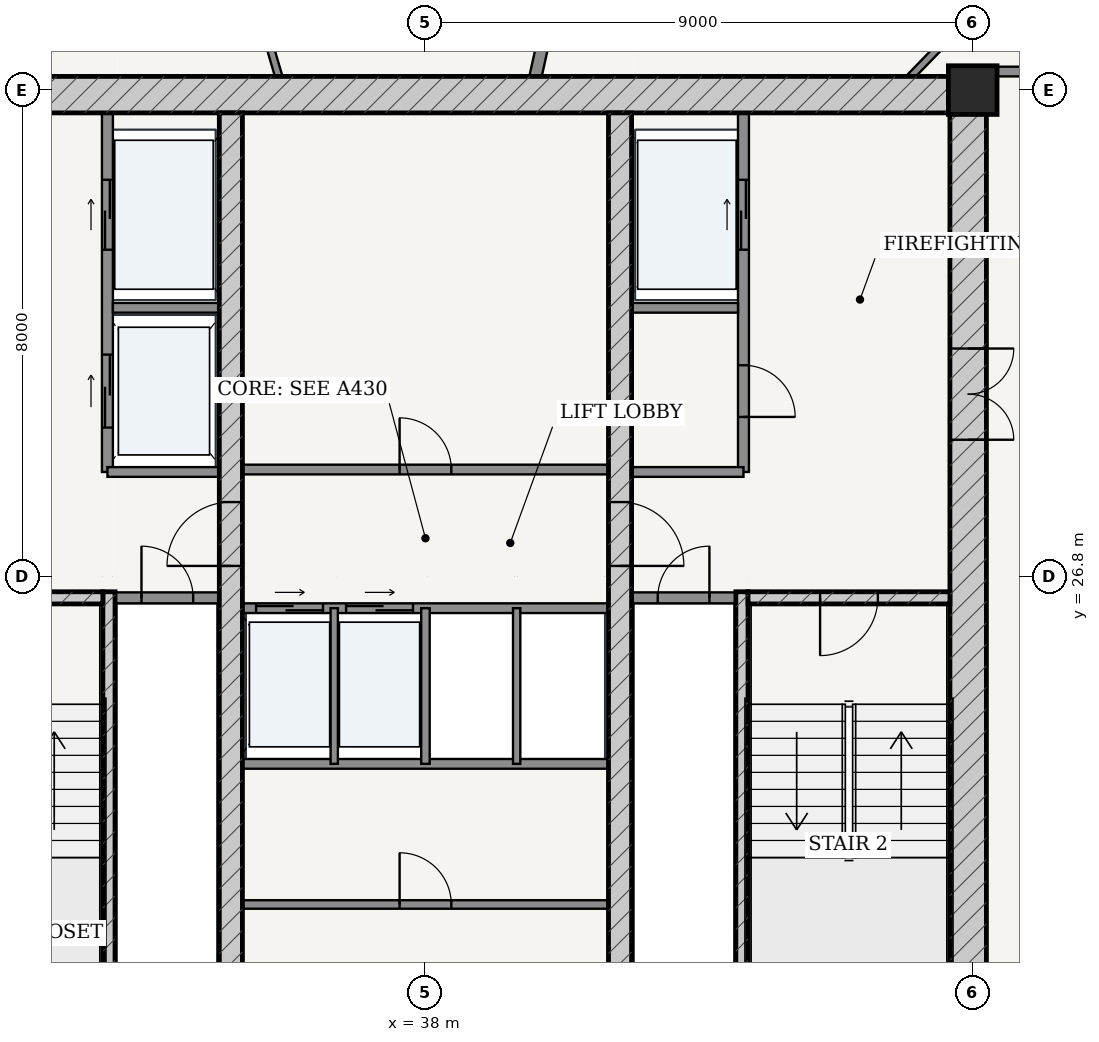
"""IFC4 building model, lengths in metres.
Left out: names, types, materials, properties, quantities, classifications, styles, units other than length and angle.
Written with IfcOpenShell. Run it as: python <this file> out.ifc"""

import sys

from ifc_helpers import new_model, si_unit, direction, frame, frame_2d, origin, origin_2d, place, context, subcontext, project, spatial, rectangle, extrude, source, transform, mapped, element, fill, save


model = new_model("IFC4")
c1 = context("Model", 3, precision=1e-05, world=origin(), true_north=direction((-0.2419218956, 0.970295726276)))
c2 = subcontext(c1, "Body", "Model", "MODEL_VIEW")
j1 = project(units=[si_unit("LENGTHUNIT", "METRE"), si_unit("PLANEANGLEUNIT", "RADIAN")], contexts=[c1])
p1 = place(None, origin())
s1 = spatial("IfcSite", under=j1, at=p1, CompositionType="ELEMENT")
p2 = place(p1, origin())
s2 = spatial("IfcBuilding", under=s1, at=p2, CompositionType="ELEMENT")
p3 = place(p2, frame((0.0, 0.0, 224.5)))
s3 = spatial("IfcBuildingStorey", under=s2, at=p3, CompositionType="ELEMENT", Elevation=224.5)
p4 = place(p3, frame((47.0, 34.8, 0.0), z_axis=(0.0, 0.0, 1.0), x_axis=(1.0, 0.0, 0.0)))
e1 = element("IfcColumn", 1, at=p4, inside=s3, PredefinedType="COLUMN", context=c2, shape_type="SweptSolid", body=[
    extrude(rectangle(XDim=0.8, YDim=0.8, at=origin_2d()), origin(), (0.0, 0.0, 1.0), 3.7),
])
p5 = place(p3, frame((28.775, 34.725, 0.0), z_axis=(0.0, 0.0, 1.0), x_axis=(1.0, 0.0, 0.0)))
e2 = element("IfcWall", 2, at=p5, inside=s3, PredefinedType="SHEAR", context=c2, shape_type="SweptSolid", body=[
    extrude(rectangle(XDim=18.45, YDim=0.6, at=frame_2d((9.225, 0.0))), origin(), (0.0, 0.0, 1.0), 3.435),
])
p6 = place(p3, frame((46.925, 19.175, 0.0), z_axis=(0.0, 0.0, 1.0), x_axis=(0.0, 1.0, 0.0)))
e3 = element("IfcWall", 3, at=p6, inside=s3, PredefinedType="SHEAR", context=c2, shape_type="SweptSolid", body=[
    extrude(rectangle(XDim=15.25, YDim=0.6, at=frame_2d((7.625, 0.0))), origin(), (0.0, 0.0, 1.0), 3.435),
])
p7 = place(p6, frame((9.875, 0.0, 0.0)))
e4 = element("IfcOpeningElement", 4, at=p7, cuts=e3, PredefinedType="OPENING", context=c2, shape_type="SweptSolid", body=[
    extrude(rectangle(XDim=1.5, YDim=2.2, at=frame_2d((0.75, 1.1))), frame((0.0, 0.31, 0.0), z_axis=(0.0, -1.0, 0.0), x_axis=(1.0, 0.0, 0.0)), (0.0, 0.0, 1.0), 0.62),
])
p8 = place(p3, frame((32.795, 19.175, 0.0), z_axis=(0.0, 0.0, 1.0), x_axis=(0.0, 1.0, 0.0)))
e5 = element("IfcWall", 5, at=p8, inside=s3, PredefinedType="SOLIDWALL", context=c2, shape_type="SweptSolid", body=[
    extrude(rectangle(XDim=7.375, YDim=0.2, at=frame_2d((3.688, 0.0))), origin(), (0.0, 0.0, 1.0), 3.435),
])
p9 = place(p3, frame((29.375, 26.45, 0.0), z_axis=(0.0, 0.0, 1.0), x_axis=(1.0, 0.0, 0.0)))
e6 = element("IfcWall", 6, at=p9, inside=s3, PredefinedType="SOLIDWALL", context=c2, shape_type="SweptSolid", body=[
    extrude(rectangle(XDim=3.32, YDim=0.2, at=frame_2d((1.66, 0.0))), origin(), (0.0, 0.0, 1.0), 3.435),
])
p10 = place(p9, frame((1.185, 0.0, 0.0)))
e7 = element("IfcOpeningElement", 7, at=p10, cuts=e6, PredefinedType="OPENING", context=c2, shape_type="SweptSolid", body=[
    extrude(rectangle(XDim=0.95, YDim=2.15, at=frame_2d((0.475, 1.075))), frame((0.0, 0.11, 0.0), z_axis=(0.0, -1.0, 0.0), x_axis=(1.0, 0.0, 0.0)), (0.0, 0.0, 1.0), 0.22),
])
p11 = place(p3, frame((43.205, 19.175, 0.0), z_axis=(0.0, 0.0, 1.0), x_axis=(0.0, 1.0, 0.0)))
e8 = element("IfcWall", 8, at=p11, inside=s3, PredefinedType="SOLIDWALL", context=c2, shape_type="SweptSolid", body=[
    extrude(rectangle(XDim=7.375, YDim=0.2, at=frame_2d((3.688, 0.0))), origin(), (0.0, 0.0, 1.0), 3.435),
])
p12 = place(p3, frame((43.305, 26.45, 0.0), z_axis=(0.0, 0.0, 1.0), x_axis=(1.0, 0.0, 0.0)))
e9 = element("IfcWall", 9, at=p12, inside=s3, PredefinedType="SOLIDWALL", context=c2, shape_type="SweptSolid", body=[
    extrude(rectangle(XDim=3.32, YDim=0.2, at=frame_2d((1.66, 0.0))), origin(), (0.0, 0.0, 1.0), 3.435),
])
p13 = place(p12, frame((1.185, 0.0, 0.0)))
e10 = element("IfcOpeningElement", 10, at=p13, cuts=e9, PredefinedType="OPENING", context=c2, shape_type="SweptSolid", body=[
    extrude(rectangle(XDim=0.95, YDim=2.15, at=frame_2d((0.475, 1.075))), frame((0.0, 0.11, 0.0), z_axis=(0.0, -1.0, 0.0), x_axis=(1.0, 0.0, 0.0)), (0.0, 0.0, 1.0), 0.22),
])
p14 = place(p3, frame((34.8, 19.175, 0.0), z_axis=(0.0, 0.0, 1.0), x_axis=(0.0, 1.0, 0.0)))
e11 = element("IfcWall", 11, at=p14, inside=s3, PredefinedType="SHEAR", context=c2, shape_type="SweptSolid", body=[
    extrude(rectangle(XDim=15.25, YDim=0.38, at=frame_2d((7.625, 0.0))), origin(), (0.0, 0.0, 1.0), 3.435),
])
p15 = place(p14, frame((7.8, 0.0, 0.0)))
e12 = element("IfcOpeningElement", 12, at=p15, cuts=e11, PredefinedType="OPENING", context=c2, shape_type="SweptSolid", body=[
    extrude(rectangle(XDim=1.05, YDim=2.15, at=frame_2d((0.525, 1.075))), frame((0.0, 0.2, 0.0), z_axis=(0.0, -1.0, 0.0), x_axis=(1.0, 0.0, 0.0)), (0.0, 0.0, 1.0), 0.4),
])
p16 = place(p3, frame((41.2, 19.175, 0.0), z_axis=(0.0, 0.0, 1.0), x_axis=(0.0, 1.0, 0.0)))
e13 = element("IfcWall", 13, at=p16, inside=s3, PredefinedType="SHEAR", context=c2, shape_type="SweptSolid", body=[
    extrude(rectangle(XDim=15.25, YDim=0.38, at=frame_2d((7.625, 0.0))), origin(), (0.0, 0.0, 1.0), 3.435),
])
p17 = place(p16, frame((7.8, 0.0, 0.0)))
e14 = element("IfcOpeningElement", 14, at=p17, cuts=e13, PredefinedType="OPENING", context=c2, shape_type="SweptSolid", body=[
    extrude(rectangle(XDim=1.05, YDim=2.15, at=frame_2d((0.525, 1.075))), frame((0.0, 0.2, 0.0), z_axis=(0.0, -1.0, 0.0), x_axis=(1.0, 0.0, 0.0)), (0.0, 0.0, 1.0), 0.4),
])
p18 = place(p3, frame((32.9, 26.45, 0.0), z_axis=(0.0, 0.0, 1.0), x_axis=(1.0, 0.0, 0.0)))
e15 = element("IfcWall", 15, at=p18, inside=s3, PredefinedType="PARTITIONING", context=c2, shape_type="SweptSolid", body=[
    extrude(rectangle(XDim=1.71, YDim=0.18, at=frame_2d((0.855, 0.0))), origin(), (0.0, 0.0, 1.0), 3.435),
])
p19 = place(p18, frame((0.43, 0.0, 0.0)))
e16 = element("IfcOpeningElement", 16, at=p19, cuts=e15, PredefinedType="OPENING", context=c2, shape_type="SweptSolid", body=[
    extrude(rectangle(XDim=0.85, YDim=2.1, at=frame_2d((0.425, 1.05))), frame((0.0, 0.1, 0.0), z_axis=(0.0, -1.0, 0.0), x_axis=(1.0, 0.0, 0.0)), (0.0, 0.0, 1.0), 0.2),
])
p20 = place(p3, frame((41.39, 26.45, 0.0), z_axis=(0.0, 0.0, 1.0), x_axis=(1.0, 0.0, 0.0)))
e17 = element("IfcWall", 17, at=p20, inside=s3, PredefinedType="PARTITIONING", context=c2, shape_type="SweptSolid", body=[
    extrude(rectangle(XDim=1.71, YDim=0.18, at=frame_2d((0.855, 0.0))), origin(), (0.0, 0.0, 1.0), 3.435),
])
p21 = place(p20, frame((0.43, 0.0, 0.0)))
e18 = element("IfcOpeningElement", 18, at=p21, cuts=e17, PredefinedType="OPENING", context=c2, shape_type="SweptSolid", body=[
    extrude(rectangle(XDim=0.85, YDim=2.1, at=frame_2d((0.425, 1.05))), frame((0.0, 0.1, 0.0), z_axis=(0.0, -1.0, 0.0), x_axis=(1.0, 0.0, 0.0)), (0.0, 0.0, 1.0), 0.2),
])
p22 = place(p3, frame((32.77, 28.52, 0.0), z_axis=(0.0, 0.0, 1.0), x_axis=(0.0, 1.0, 0.0)))
e19 = element("IfcWall", 19, at=p22, inside=s3, PredefinedType="PARTITIONING", context=c2, shape_type="SweptSolid", body=[
    extrude(rectangle(XDim=5.905, YDim=0.18, at=frame_2d((2.953, 0.0))), origin(), (0.0, 0.0, 1.0), 3.435),
])
p23 = place(p22, frame((3.655, 0.0, 0.0)))
e20 = element("IfcOpeningElement", 20, at=p23, cuts=e19, PredefinedType="OPENING", context=c2, shape_type="SweptSolid", body=[
    extrude(rectangle(XDim=1.15, YDim=2.2, at=frame_2d((0.575, 1.1))), frame((0.0, 0.1, 0.0), z_axis=(0.0, -1.0, 0.0), x_axis=(1.0, 0.0, 0.0)), (0.0, 0.0, 1.0), 0.2),
])
p24 = place(p22, frame((0.73, 0.0, 0.0)))
e21 = element("IfcOpeningElement", 21, at=p24, cuts=e19, PredefinedType="OPENING", context=c2, shape_type="SweptSolid", body=[
    extrude(rectangle(XDim=1.2, YDim=2.25, at=frame_2d((0.6, 1.125))), frame((0.0, 0.1, 0.0), z_axis=(0.0, -1.0, 0.0), x_axis=(1.0, 0.0, 0.0)), (0.0, 0.0, 1.0), 0.2),
])
p25 = place(p3, frame((32.86, 31.22, 0.0), z_axis=(0.0, 0.0, 1.0), x_axis=(1.0, 0.0, 0.0)))
e22 = element("IfcWall", 22, at=p25, inside=s3, PredefinedType="PARTITIONING", context=c2, shape_type="SweptSolid", body=[
    extrude(rectangle(XDim=1.75, YDim=0.16, at=frame_2d((0.875, 0.0))), origin(), (0.0, 0.0, 1.0), 3.435),
])
p26 = place(p3, frame((32.77, 28.52, 0.0), z_axis=(0.0, 0.0, 1.0), x_axis=(1.0, 0.0, 0.0)))
e23 = element("IfcWall", 23, at=p26, inside=s3, PredefinedType="PARTITIONING", context=c2, shape_type="SweptSolid", body=[
    extrude(rectangle(XDim=1.84, YDim=0.16, at=frame_2d((0.92, 0.0))), origin(), (0.0, 0.0, 1.0), 3.435),
])
p27 = place(p3, frame((43.23, 28.52, 0.0), z_axis=(0.0, 0.0, 1.0), x_axis=(0.0, 1.0, 0.0)))
e24 = element("IfcWall", 24, at=p27, inside=s3, PredefinedType="PARTITIONING", context=c2, shape_type="SweptSolid", body=[
    extrude(rectangle(XDim=5.905, YDim=0.18, at=frame_2d((2.953, 0.0))), origin(), (0.0, 0.0, 1.0), 3.435),
])
p28 = place(p27, frame((0.905, 0.0, 0.0)))
e25 = element("IfcOpeningElement", 25, at=p28, cuts=e24, PredefinedType="OPENING", context=c2, shape_type="SweptSolid", body=[
    extrude(rectangle(XDim=0.85, YDim=2.1, at=frame_2d((0.425, 1.05))), frame((0.0, 0.1, 0.0), z_axis=(0.0, -1.0, 0.0), x_axis=(1.0, 0.0, 0.0)), (0.0, 0.0, 1.0), 0.2),
])
p29 = place(p27, frame((3.655, 0.0, 0.0)))
e26 = element("IfcOpeningElement", 26, at=p29, cuts=e24, PredefinedType="OPENING", context=c2, shape_type="SweptSolid", body=[
    extrude(rectangle(XDim=1.15, YDim=2.2, at=frame_2d((0.575, 1.1))), frame((0.0, 0.1, 0.0), z_axis=(0.0, -1.0, 0.0), x_axis=(1.0, 0.0, 0.0)), (0.0, 0.0, 1.0), 0.2),
])
p30 = place(p3, frame((41.39, 31.22, 0.0), z_axis=(0.0, 0.0, 1.0), x_axis=(1.0, 0.0, 0.0)))
e27 = element("IfcWall", 27, at=p30, inside=s3, PredefinedType="PARTITIONING", context=c2, shape_type="SweptSolid", body=[
    extrude(rectangle(XDim=1.75, YDim=0.16, at=frame_2d((0.875, 0.0))), origin(), (0.0, 0.0, 1.0), 3.435),
])
p31 = place(p3, frame((41.39, 28.52, 0.0), z_axis=(0.0, 0.0, 1.0), x_axis=(1.0, 0.0, 0.0)))
e28 = element("IfcWall", 28, at=p31, inside=s3, PredefinedType="PARTITIONING", context=c2, shape_type="SweptSolid", body=[
    extrude(rectangle(XDim=1.84, YDim=0.16, at=frame_2d((0.92, 0.0))), origin(), (0.0, 0.0, 1.0), 3.435),
])
p32 = place(p3, frame((34.99, 28.56, 0.0), z_axis=(0.0, 0.0, 1.0), x_axis=(1.0, 0.0, 0.0)))
e29 = element("IfcWall", 29, at=p32, inside=s3, PredefinedType="PARTITIONING", context=c2, shape_type="SweptSolid", body=[
    extrude(rectangle(XDim=6.02, YDim=0.16, at=frame_2d((3.01, 0.0))), origin(), (0.0, 0.0, 1.0), 3.435),
])
p33 = place(p32, frame((2.585, 0.0, 0.0)))
e30 = element("IfcOpeningElement", 30, at=p33, cuts=e29, PredefinedType="OPENING", context=c2, shape_type="SweptSolid", body=[
    extrude(rectangle(XDim=0.85, YDim=2.1, at=frame_2d((0.425, 1.05))), frame((0.0, 0.09, 0.0), z_axis=(0.0, -1.0, 0.0), x_axis=(1.0, 0.0, 0.0)), (0.0, 0.0, 1.0), 0.18),
])
p34 = place(p3, frame((34.99, 26.28, 0.0), z_axis=(0.0, 0.0, 1.0), x_axis=(1.0, 0.0, 0.0)))
e31 = element("IfcWall", 31, at=p34, inside=s3, PredefinedType="PARTITIONING", context=c2, shape_type="SweptSolid", body=[
    extrude(rectangle(XDim=6.02, YDim=0.16, at=frame_2d((3.01, 0.0))), origin(), (0.0, 0.0, 1.0), 3.435),
])
p35 = place(p34, frame((0.225, 0.0, 0.0)))
e32 = element("IfcOpeningElement", 32, at=p35, cuts=e31, PredefinedType="OPENING", context=c2, shape_type="SweptSolid", body=[
    extrude(rectangle(XDim=1.1, YDim=2.2, at=frame_2d((0.55, 1.1))), frame((0.0, 0.09, 0.0), z_axis=(0.0, -1.0, 0.0), x_axis=(1.0, 0.0, 0.0)), (0.0, 0.0, 1.0), 0.18),
])
p36 = place(p34, frame((1.705, 0.0, 0.0)))
e33 = element("IfcOpeningElement", 33, at=p36, cuts=e31, PredefinedType="OPENING", context=c2, shape_type="SweptSolid", body=[
    extrude(rectangle(XDim=1.1, YDim=2.2, at=frame_2d((0.55, 1.1))), frame((0.0, 0.09, 0.0), z_axis=(0.0, -1.0, 0.0), x_axis=(1.0, 0.0, 0.0)), (0.0, 0.0, 1.0), 0.18),
])
p37 = place(p3, frame((34.99, 23.72, 0.0), z_axis=(0.0, 0.0, 1.0), x_axis=(1.0, 0.0, 0.0)))
e34 = element("IfcWall", 34, at=p37, inside=s3, PredefinedType="PARTITIONING", context=c2, shape_type="SweptSolid", body=[
    extrude(rectangle(XDim=6.02, YDim=0.16, at=frame_2d((3.01, 0.0))), origin(), (0.0, 0.0, 1.0), 3.435),
])
p38 = place(p3, frame((36.5, 23.72, 0.0), z_axis=(0.0, 0.0, 1.0), x_axis=(0.0, 1.0, 0.0)))
e35 = element("IfcWall", 35, at=p38, inside=s3, PredefinedType="PARTITIONING", context=c2, shape_type="SweptSolid", body=[
    extrude(rectangle(XDim=2.56, YDim=0.12, at=frame_2d((1.28, 0.0))), origin(), (0.0, 0.0, 1.0), 3.435),
])
p39 = place(p3, frame((38.0, 23.72, 0.0), z_axis=(0.0, 0.0, 1.0), x_axis=(0.0, 1.0, 0.0)))
e36 = element("IfcWall", 36, at=p39, inside=s3, PredefinedType="PARTITIONING", context=c2, shape_type="SweptSolid", body=[
    extrude(rectangle(XDim=2.56, YDim=0.14, at=frame_2d((1.28, 0.0))), origin(), (0.0, 0.0, 1.0), 3.435),
])
p40 = place(p3, frame((39.5, 23.72, 0.0), z_axis=(0.0, 0.0, 1.0), x_axis=(0.0, 1.0, 0.0)))
e37 = element("IfcWall", 37, at=p40, inside=s3, PredefinedType="PARTITIONING", context=c2, shape_type="SweptSolid", body=[
    extrude(rectangle(XDim=2.56, YDim=0.12, at=frame_2d((1.28, 0.0))), origin(), (0.0, 0.0, 1.0), 3.435),
])
p41 = place(p3, frame((34.99, 21.407, 0.0), z_axis=(0.0, 0.0, 1.0), x_axis=(1.0, 0.0, 0.0)))
e38 = element("IfcWall", 38, at=p41, inside=s3, PredefinedType="PARTITIONING", context=c2, shape_type="SweptSolid", body=[
    extrude(rectangle(XDim=6.02, YDim=0.14, at=frame_2d((3.01, 0.0))), origin(), (0.0, 0.0, 1.0), 3.435),
])
p42 = place(p41, frame((2.585, 0.0, 0.0)))
e39 = element("IfcOpeningElement", 39, at=p42, cuts=e38, PredefinedType="OPENING", context=c2, shape_type="SweptSolid", body=[
    extrude(rectangle(XDim=0.85, YDim=2.1, at=frame_2d((0.425, 1.05))), frame((0.0, 0.08, 0.0), z_axis=(0.0, -1.0, 0.0), x_axis=(1.0, 0.0, 0.0)), (0.0, 0.0, 1.0), 0.16),
])
p43 = place(p3, frame((47.225, 35.105, 0.0), z_axis=(0.0, 0.0, 1.0), x_axis=(1.0, 0.0, 0.0)))
e40 = element("IfcWall", 40, at=p43, inside=s3, PredefinedType="PARTITIONING", context=c2, shape_type="SweptSolid", body=[
    extrude(rectangle(XDim=1.93, YDim=0.16, at=frame_2d((0.965, 0.0))), origin(), (0.0, 0.0, 1.0), 3.435),
])
p44 = place(p3, frame((39.811, 35.027, 0.0), z_axis=(0.0, 0.0, 1.0), x_axis=(0.214966857327, 0.976621344356, 0.0)))
e41 = element("IfcWall", 41, at=p44, inside=s3, PredefinedType="PARTITIONING", context=c2, shape_type="SweptSolid", body=[
    extrude(rectangle(XDim=11.258, YDim=0.2, at=frame_2d((5.629, 0.0))), origin(), (0.0, 0.0, 1.0), 2.52),
])
p45 = place(p3, frame((35.586, 35.027, 0.0), z_axis=(0.0, 0.0, 1.0), x_axis=(-0.281539118681, 0.959549751004, 0.0)))
e42 = element("IfcWall", 42, at=p45, inside=s3, PredefinedType="PARTITIONING", context=c2, shape_type="SweptSolid", body=[
    extrude(rectangle(XDim=2.698, YDim=0.12, at=frame_2d((1.349, 0.0))), origin(), (0.0, 0.0, 1.0), 2.52),
])
p46 = place(p45, frame((0.919, 0.0, 0.0)))
e43 = element("IfcOpeningElement", 43, at=p46, cuts=e42, PredefinedType="OPENING", context=c2, shape_type="SweptSolid", body=[
    extrude(rectangle(XDim=0.86, YDim=2.15, at=frame_2d((0.43, 1.075))), frame((0.0, 0.07, 0.0), z_axis=(0.0, -1.0, 0.0), x_axis=(1.0, 0.0, 0.0)), (0.0, 0.0, 1.0), 0.14),
])
p47 = place(p3, frame((45.983, 35.026, 0.0), z_axis=(0.0, 0.0, 1.0), x_axis=(0.696410097703, 0.717644045344, 0.0)))
e44 = element("IfcWall", 44, at=p47, inside=s3, PredefinedType="PARTITIONING", context=c2, shape_type="SweptSolid", body=[
    extrude(rectangle(XDim=3.852, YDim=0.12, at=frame_2d((1.926, 0.0))), origin(), (0.0, 0.0, 1.0), 2.951),
])
p48 = place(p47, frame((1.496, 0.0, 0.0)))
e45 = element("IfcOpeningElement", 45, at=p48, cuts=e44, PredefinedType="OPENING", context=c2, shape_type="SweptSolid", body=[
    extrude(rectangle(XDim=0.86, YDim=2.15, at=frame_2d((0.43, 1.075))), frame((0.0, 0.07, 0.0), z_axis=(0.0, -1.0, 0.0), x_axis=(1.0, 0.0, 0.0)), (0.0, 0.0, 1.0), 0.14),
])
m1 = source(origin(), c2, "Body", "SweptSolid", [
    extrude(rectangle(XDim=1.5, YDim=2.2, at=frame_2d((0.75, 1.1))), frame((0.0, 0.025, 0.0), z_axis=(0.0, -1.0, 0.0), x_axis=(1.0, 0.0, 0.0)), (0.0, 0.0, 1.0), 0.05),
])
p49 = place(p7, frame((1.5, 0.0, 0.0), z_axis=(0.0, 0.0, 1.0), x_axis=(-1.0, 0.0, 0.0)))
e46 = element("IfcDoor", 46, at=p49, inside=s3, OperationType="DOUBLE_DOOR_SINGLE_SWING", PredefinedType="DOOR", context=c2, shape_type="MappedRepresentation", body=[
    mapped(m1, transform((0.0, 0.0, 0.0), scale=1.0)),
])
fill(e4, e46)
m2 = source(origin(), c2, "Body", "SweptSolid", [
    extrude(rectangle(XDim=1.05, YDim=2.15, at=frame_2d((0.525, 1.075))), frame((0.0, 0.025, 0.0), z_axis=(0.0, -1.0, 0.0), x_axis=(1.0, 0.0, 0.0)), (0.0, 0.0, 1.0), 0.05),
])
p50 = place(p15, origin())
e47 = element("IfcDoor", 47, at=p50, inside=s3, OperationType="SINGLE_SWING_LEFT", PredefinedType="DOOR", context=c2, shape_type="MappedRepresentation", body=[
    mapped(m2, transform((0.0, 0.0, 0.0), scale=1.0)),
])
fill(e12, e47)
p51 = place(p17, frame((1.05, 0.0, 0.0), z_axis=(0.0, 0.0, 1.0), x_axis=(-1.0, 0.0, 0.0)))
e48 = element("IfcDoor", 48, at=p51, inside=s3, OperationType="SINGLE_SWING_RIGHT", PredefinedType="DOOR", context=c2, shape_type="MappedRepresentation", body=[
    mapped(m2, transform((0.0, 0.0, 0.0), scale=1.0)),
])
fill(e14, e48)
m3 = source(origin(), c2, "Body", "SweptSolid", [
    extrude(rectangle(XDim=0.95, YDim=2.15, at=frame_2d((0.475, 1.075))), frame((0.0, 0.025, 0.0), z_axis=(0.0, -1.0, 0.0), x_axis=(1.0, 0.0, 0.0)), (0.0, 0.0, 1.0), 0.05),
])
p52 = place(p13, frame((0.95, 0.0, 0.0), z_axis=(0.0, 0.0, 1.0), x_axis=(-1.0, 0.0, 0.0)))
e49 = element("IfcDoor", 49, at=p52, inside=s3, OperationType="SINGLE_SWING_RIGHT", PredefinedType="DOOR", context=c2, shape_type="MappedRepresentation", body=[
    mapped(m3, transform((0.0, 0.0, 0.0), scale=1.0)),
])
fill(e10, e49)
m4 = source(origin(), c2, "Body", "SweptSolid", [
    extrude(rectangle(XDim=0.85, YDim=2.1, at=frame_2d((0.425, 1.05))), frame((0.0, 0.025, 0.0), z_axis=(0.0, -1.0, 0.0), x_axis=(1.0, 0.0, 0.0)), (0.0, 0.0, 1.0), 0.05),
])
p53 = place(p19, origin())
e50 = element("IfcDoor", 50, at=p53, inside=s3, OperationType="SINGLE_SWING_LEFT", PredefinedType="DOOR", context=c2, shape_type="MappedRepresentation", body=[
    mapped(m4, transform((0.0, 0.0, 0.0), scale=1.0)),
])
fill(e16, e50)
p54 = place(p21, origin())
e51 = element("IfcDoor", 51, at=p54, inside=s3, OperationType="SINGLE_SWING_RIGHT", PredefinedType="DOOR", context=c2, shape_type="MappedRepresentation", body=[
    mapped(m4, transform((0.0, 0.0, 0.0), scale=1.0)),
])
fill(e18, e51)
p55 = place(p28, frame((0.85, 0.0, 0.0), z_axis=(0.0, 0.0, 1.0), x_axis=(-1.0, 0.0, 0.0)))
e52 = element("IfcDoor", 52, at=p55, inside=s3, OperationType="SINGLE_SWING_RIGHT", PredefinedType="DOOR", context=c2, shape_type="MappedRepresentation", body=[
    mapped(m4, transform((0.0, 0.0, 0.0), scale=1.0)),
])
fill(e25, e52)
p56 = place(p33, origin())
e53 = element("IfcDoor", 53, at=p56, inside=s3, OperationType="SINGLE_SWING_LEFT", PredefinedType="DOOR", context=c2, shape_type="MappedRepresentation", body=[
    mapped(m4, transform((0.0, 0.0, 0.0), scale=1.0)),
])
fill(e30, e53)
p57 = place(p42, origin())
e54 = element("IfcDoor", 54, at=p57, inside=s3, OperationType="SINGLE_SWING_LEFT", PredefinedType="DOOR", context=c2, shape_type="MappedRepresentation", body=[
    mapped(m4, transform((0.0, 0.0, 0.0), scale=1.0)),
])
fill(e39, e54)
m5 = source(origin(), c2, "Body", "SweptSolid", [
    extrude(rectangle(XDim=1.15, YDim=2.2, at=frame_2d((0.575, 1.1))), frame((0.0, 0.025, 0.0), z_axis=(0.0, -1.0, 0.0), x_axis=(1.0, 0.0, 0.0)), (0.0, 0.0, 1.0), 0.05),
])
p58 = place(p23, origin())
e55 = element("IfcDoor", 55, at=p58, inside=s3, OperationType="DOUBLE_DOOR_SLIDING", PredefinedType="DOOR", context=c2, shape_type="MappedRepresentation", body=[
    mapped(m5, transform((0.0, 0.0, 0.0), scale=1.0)),
])
fill(e20, e55)
p59 = place(p29, origin())
e56 = element("IfcDoor", 56, at=p59, inside=s3, OperationType="DOUBLE_DOOR_SLIDING", PredefinedType="DOOR", context=c2, shape_type="MappedRepresentation", body=[
    mapped(m5, transform((0.0, 0.0, 0.0), scale=1.0)),
])
fill(e26, e56)
m6 = source(origin(), c2, "Body", "SweptSolid", [
    extrude(rectangle(XDim=1.2, YDim=2.25, at=frame_2d((0.6, 1.125))), frame((0.0, 0.025, 0.0), z_axis=(0.0, -1.0, 0.0), x_axis=(1.0, 0.0, 0.0)), (0.0, 0.0, 1.0), 0.05),
])
p60 = place(p24, origin())
e57 = element("IfcDoor", 57, at=p60, inside=s3, OperationType="DOUBLE_DOOR_SLIDING", PredefinedType="DOOR", context=c2, shape_type="MappedRepresentation", body=[
    mapped(m6, transform((0.0, 0.0, 0.0), scale=1.0)),
])
fill(e21, e57)
m7 = source(origin(), c2, "Body", "SweptSolid", [
    extrude(rectangle(XDim=1.1, YDim=2.2, at=frame_2d((0.55, 1.1))), frame((0.0, 0.025, 0.0), z_axis=(0.0, -1.0, 0.0), x_axis=(1.0, 0.0, 0.0)), (0.0, 0.0, 1.0), 0.05),
])
p61 = place(p35, origin())
e58 = element("IfcDoor", 58, at=p61, inside=s3, OperationType="DOUBLE_DOOR_SLIDING", PredefinedType="DOOR", context=c2, shape_type="MappedRepresentation", body=[
    mapped(m7, transform((0.0, 0.0, 0.0), scale=1.0)),
])
fill(e32, e58)
p62 = place(p36, origin())
e59 = element("IfcDoor", 59, at=p62, inside=s3, OperationType="DOUBLE_DOOR_SLIDING", PredefinedType="DOOR", context=c2, shape_type="MappedRepresentation", body=[
    mapped(m7, transform((0.0, 0.0, 0.0), scale=1.0)),
])
fill(e33, e59)
save(model, sys.argv[1])
